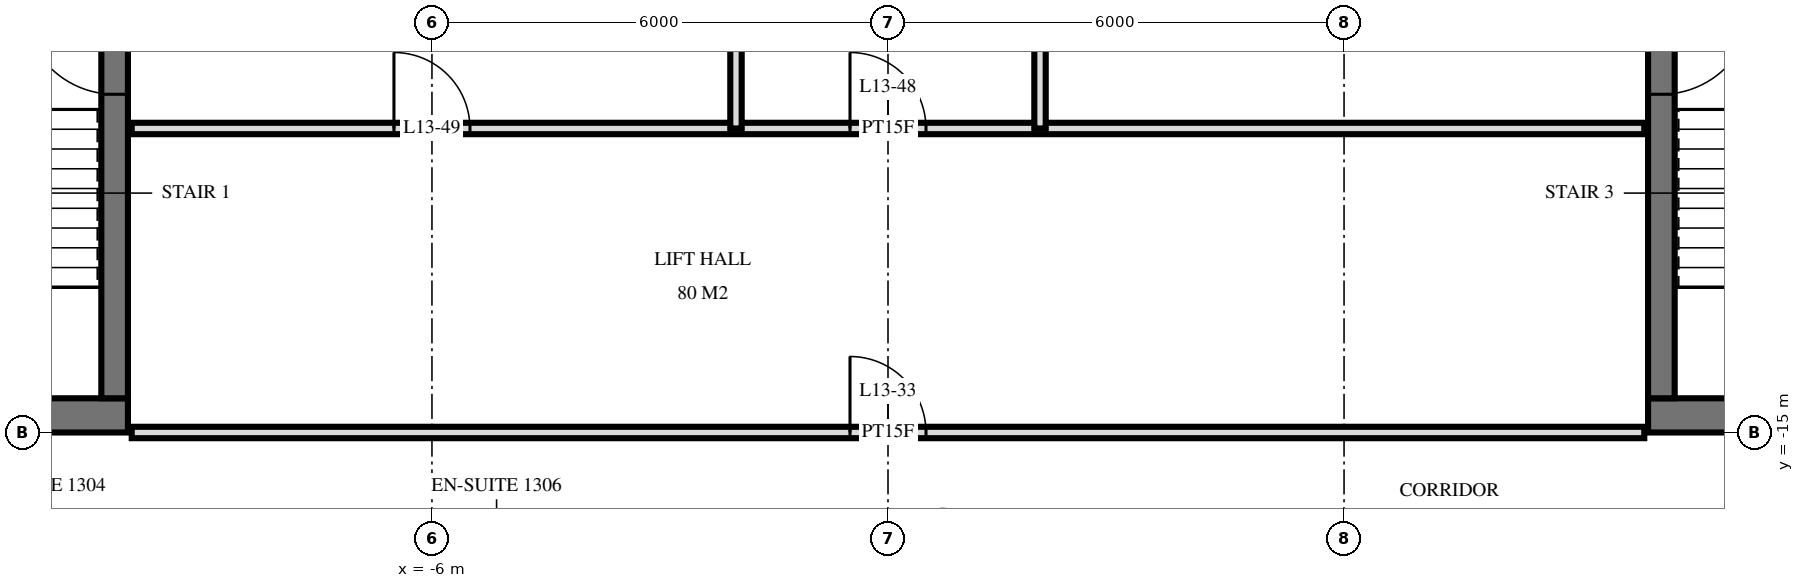
"""IFC4 building model, lengths in metres.
Left out: names, types, materials, properties, quantities, classifications, styles, units other than length and angle.
Written with IfcOpenShell. Run it as: python <this file> out.ifc"""

import sys

from ifc_helpers import new_model, si_unit, direction, frame, frame_2d, origin, place, context, subcontext, project, spatial, rectangle, extrude, element, fill, save


model = new_model("IFC4")
c1 = context("Model", 3, precision=1e-05, world=origin(), true_north=direction((0.0, 1.0)))
c2 = subcontext(c1, "Body", "Model", "MODEL_VIEW")
j1 = project(units=[si_unit("LENGTHUNIT", "METRE"), si_unit("PLANEANGLEUNIT", "RADIAN")], contexts=[c1])
p1 = place(None, origin())
s1 = spatial("IfcSite", under=j1, at=p1, CompositionType="ELEMENT")
p2 = place(p1, origin())
s2 = spatial("IfcBuilding", under=s1, at=p2, CompositionType="ELEMENT")
p3 = place(p2, frame((0.0, 0.0, 56.4)))
s3 = spatial("IfcBuildingStorey", under=s2, at=p3, CompositionType="ELEMENT", Elevation=56.4)
p4 = place(p3, frame((-29.5, -14.775, 0.0), z_axis=(0.0, 0.0, 1.0), x_axis=(1.0, 0.0, 0.0)))
e1 = element("IfcWall", 1, at=p4, inside=s3, PredefinedType="SHEAR", context=c2, shape_type="SweptSolid", body=[
    extrude(rectangle(XDim=19.5, YDim=0.45, at=frame_2d((9.75, 0.0))), origin(), (0.0, 0.0, 1.0), 3.6),
])
p5 = place(p4, frame((11.2, 0.0, 0.0)))
e2 = element("IfcOpeningElement", 2, at=p5, cuts=e1, PredefinedType="OPENING", context=c2, shape_type="SweptSolid", body=[
    extrude(rectangle(XDim=1.2, YDim=2.1, at=frame_2d((0.6, 1.05))), frame((0.0, 0.235, 0.0), z_axis=(0.0, -1.0, 0.0), x_axis=(1.0, 0.0, 0.0)), (0.0, 0.0, 1.0), 0.47),
])
p6 = place(p4, frame((14.25, 0.0, 0.0)))
e3 = element("IfcOpeningElement", 3, at=p6, cuts=e1, PredefinedType="OPENING", context=c2, shape_type="SweptSolid", body=[
    extrude(rectangle(XDim=1.1, YDim=2.1, at=frame_2d((0.55, 1.05))), frame((0.0, 0.235, 0.0), z_axis=(0.0, -1.0, 0.0), x_axis=(1.0, 0.0, 0.0)), (0.0, 0.0, 1.0), 0.47),
])
p7 = place(p4, frame((8.5, 0.0, 0.0)))
e4 = element("IfcOpeningElement", 4, at=p7, cuts=e1, PredefinedType="OPENING", context=c2, shape_type="SweptSolid", body=[
    extrude(rectangle(XDim=0.9, YDim=2.1, at=frame_2d((0.45, 1.05))), frame((0.0, 0.235, 0.0), z_axis=(0.0, -1.0, 0.0), x_axis=(1.0, 0.0, 0.0)), (0.0, 0.0, 1.0), 0.47),
])
p8 = place(p4, frame((6.05, 0.0, 0.0)))
e5 = element("IfcOpeningElement", 5, at=p8, cuts=e1, PredefinedType="OPENING", context=c2, shape_type="SweptSolid", body=[
    extrude(rectangle(XDim=1.0, YDim=2.1, at=frame_2d((0.5, 1.05))), frame((0.0, 0.235, 0.0), z_axis=(0.0, -1.0, 0.0), x_axis=(1.0, 0.0, 0.0)), (0.0, 0.0, 1.0), 0.47),
])
p9 = place(p4, frame((3.413, 0.0, 0.0)))
e6 = element("IfcOpeningElement", 6, at=p9, cuts=e1, PredefinedType="OPENING", context=c2, shape_type="SweptSolid", body=[
    extrude(rectangle(XDim=1.0, YDim=2.1, at=frame_2d((0.5, 1.05))), frame((0.0, 0.235, 0.0), z_axis=(0.0, -1.0, 0.0), x_axis=(1.0, 0.0, 0.0)), (0.0, 0.0, 1.0), 0.47),
])
p10 = place(p4, frame((1.087, 0.0, 0.0)))
e7 = element("IfcOpeningElement", 7, at=p10, cuts=e1, PredefinedType="OPENING", context=c2, shape_type="SweptSolid", body=[
    extrude(rectangle(XDim=1.0, YDim=2.1, at=frame_2d((0.5, 1.05))), frame((0.0, 0.235, 0.0), z_axis=(0.0, -1.0, 0.0), x_axis=(1.0, 0.0, 0.0)), (0.0, 0.0, 1.0), 0.47),
])
p11 = place(p3, frame((-10.175, -14.55, 0.0), z_axis=(0.0, 0.0, 1.0), x_axis=(0.0, 1.0, 0.0)))
e8 = element("IfcWall", 8, at=p11, inside=s3, PredefinedType="SHEAR", context=c2, shape_type="SweptSolid", body=[
    extrude(rectangle(XDim=14.1, YDim=0.35, at=frame_2d((7.05, 0.0))), origin(), (0.0, 0.0, 1.0), 3.6),
])
p12 = place(p11, frame((8.4, 0.0, 0.0)))
e9 = element("IfcOpeningElement", 9, at=p12, cuts=e8, PredefinedType="OPENING", context=c2, shape_type="SweptSolid", body=[
    extrude(rectangle(XDim=1.4, YDim=2.4, at=frame_2d((0.7, 1.2))), frame((0.0, 0.185, 0.0), z_axis=(0.0, -1.0, 0.0), x_axis=(1.0, 0.0, 0.0)), (0.0, 0.0, 1.0), 0.37),
])
p13 = place(p11, frame((10.0, 0.0, 0.0)))
e10 = element("IfcOpeningElement", 10, at=p13, cuts=e8, PredefinedType="OPENING", context=c2, shape_type="SweptSolid", body=[
    extrude(rectangle(XDim=1.4, YDim=2.4, at=frame_2d((0.7, 1.2))), frame((0.0, 0.185, 0.0), z_axis=(0.0, -1.0, 0.0), x_axis=(1.0, 0.0, 0.0)), (0.0, 0.0, 1.0), 0.37),
])
p14 = place(p11, frame((4.0, 0.0, 0.0)))
e11 = element("IfcOpeningElement", 11, at=p14, cuts=e8, PredefinedType="OPENING", context=c2, shape_type="SweptSolid", body=[
    extrude(rectangle(XDim=1.2, YDim=2.1, at=frame_2d((0.6, 1.05))), frame((0.0, 0.185, 0.0), z_axis=(0.0, -1.0, 0.0), x_axis=(1.0, 0.0, 0.0)), (0.0, 0.0, 1.0), 0.37),
])
p15 = place(p3, frame((10.0, -14.775, 0.0), z_axis=(0.0, 0.0, 1.0), x_axis=(1.0, 0.0, 0.0)))
e12 = element("IfcWall", 12, at=p15, inside=s3, PredefinedType="SHEAR", context=c2, shape_type="SweptSolid", body=[
    extrude(rectangle(XDim=19.5, YDim=0.45, at=frame_2d((9.75, 0.0))), origin(), (0.0, 0.0, 1.0), 3.6),
])
p16 = place(p15, frame((7.1, 0.0, 0.0)))
e13 = element("IfcOpeningElement", 13, at=p16, cuts=e12, PredefinedType="OPENING", context=c2, shape_type="SweptSolid", body=[
    extrude(rectangle(XDim=1.2, YDim=2.1, at=frame_2d((0.6, 1.05))), frame((0.0, 0.235, 0.0), z_axis=(0.0, -1.0, 0.0), x_axis=(1.0, 0.0, 0.0)), (0.0, 0.0, 1.0), 0.47),
])
p17 = place(p15, frame((4.15, 0.0, 0.0)))
e14 = element("IfcOpeningElement", 14, at=p17, cuts=e12, PredefinedType="OPENING", context=c2, shape_type="SweptSolid", body=[
    extrude(rectangle(XDim=1.1, YDim=2.1, at=frame_2d((0.55, 1.05))), frame((0.0, 0.235, 0.0), z_axis=(0.0, -1.0, 0.0), x_axis=(1.0, 0.0, 0.0)), (0.0, 0.0, 1.0), 0.47),
])
p18 = place(p15, frame((10.1, 0.0, 0.0)))
e15 = element("IfcOpeningElement", 15, at=p18, cuts=e12, PredefinedType="OPENING", context=c2, shape_type="SweptSolid", body=[
    extrude(rectangle(XDim=0.9, YDim=2.1, at=frame_2d((0.45, 1.05))), frame((0.0, 0.235, 0.0), z_axis=(0.0, -1.0, 0.0), x_axis=(1.0, 0.0, 0.0)), (0.0, 0.0, 1.0), 0.47),
])
p19 = place(p15, frame((12.45, 0.0, 0.0)))
e16 = element("IfcOpeningElement", 16, at=p19, cuts=e12, PredefinedType="OPENING", context=c2, shape_type="SweptSolid", body=[
    extrude(rectangle(XDim=1.0, YDim=2.1, at=frame_2d((0.5, 1.05))), frame((0.0, 0.235, 0.0), z_axis=(0.0, -1.0, 0.0), x_axis=(1.0, 0.0, 0.0)), (0.0, 0.0, 1.0), 0.47),
])
p20 = place(p15, frame((15.087, 0.0, 0.0)))
e17 = element("IfcOpeningElement", 17, at=p20, cuts=e12, PredefinedType="OPENING", context=c2, shape_type="SweptSolid", body=[
    extrude(rectangle(XDim=1.0, YDim=2.1, at=frame_2d((0.5, 1.05))), frame((0.0, 0.235, 0.0), z_axis=(0.0, -1.0, 0.0), x_axis=(1.0, 0.0, 0.0)), (0.0, 0.0, 1.0), 0.47),
])
p21 = place(p15, frame((17.413, 0.0, 0.0)))
e18 = element("IfcOpeningElement", 18, at=p21, cuts=e12, PredefinedType="OPENING", context=c2, shape_type="SweptSolid", body=[
    extrude(rectangle(XDim=1.0, YDim=2.1, at=frame_2d((0.5, 1.05))), frame((0.0, 0.235, 0.0), z_axis=(0.0, -1.0, 0.0), x_axis=(1.0, 0.0, 0.0)), (0.0, 0.0, 1.0), 0.47),
])
p22 = place(p3, frame((10.175, -14.55, 0.0), z_axis=(0.0, 0.0, 1.0), x_axis=(0.0, 1.0, 0.0)))
e19 = element("IfcWall", 19, at=p22, inside=s3, PredefinedType="SHEAR", context=c2, shape_type="SweptSolid", body=[
    extrude(rectangle(XDim=14.1, YDim=0.35, at=frame_2d((7.05, 0.0))), origin(), (0.0, 0.0, 1.0), 3.6),
])
p23 = place(p22, frame((8.4, 0.0, 0.0)))
e20 = element("IfcOpeningElement", 20, at=p23, cuts=e19, PredefinedType="OPENING", context=c2, shape_type="SweptSolid", body=[
    extrude(rectangle(XDim=1.4, YDim=2.4, at=frame_2d((0.7, 1.2))), frame((0.0, 0.185, 0.0), z_axis=(0.0, -1.0, 0.0), x_axis=(1.0, 0.0, 0.0)), (0.0, 0.0, 1.0), 0.37),
])
p24 = place(p22, frame((10.0, 0.0, 0.0)))
e21 = element("IfcOpeningElement", 21, at=p24, cuts=e19, PredefinedType="OPENING", context=c2, shape_type="SweptSolid", body=[
    extrude(rectangle(XDim=1.4, YDim=2.4, at=frame_2d((0.7, 1.2))), frame((0.0, 0.185, 0.0), z_axis=(0.0, -1.0, 0.0), x_axis=(1.0, 0.0, 0.0)), (0.0, 0.0, 1.0), 0.37),
])
p25 = place(p22, frame((4.0, 0.0, 0.0)))
e22 = element("IfcOpeningElement", 22, at=p25, cuts=e19, PredefinedType="OPENING", context=c2, shape_type="SweptSolid", body=[
    extrude(rectangle(XDim=1.2, YDim=2.1, at=frame_2d((0.6, 1.05))), frame((0.0, 0.185, 0.0), z_axis=(0.0, -1.0, 0.0), x_axis=(1.0, 0.0, 0.0)), (0.0, 0.0, 1.0), 0.37),
])
for number, where, z_axis, x_axis in (
    (23, (2.0, -11.0, 0.0), (0.0, 0.0, 1.0), (0.0, 1.0, 0.0)),
    (24, (-2.0, -11.0, 0.0), (0.0, 0.0, 1.0), (0.0, 1.0, 0.0)),
):
    element("IfcWall", number, at=place(p3, frame(where, z_axis=z_axis, x_axis=x_axis)), inside=s3, PredefinedType="PARTITIONING", context=c2, shape_type="SweptSolid", body=[
        extrude(rectangle(XDim=4.0, YDim=0.15, at=frame_2d((2.0, 0.0))), origin(), (0.0, 0.0, 1.0), 3.32),
    ])
p26 = place(p3, frame((-9.95, -15.0, 0.0), z_axis=(0.0, 0.0, 1.0), x_axis=(1.0, 0.0, 0.0)))
e25 = element("IfcWall", 25, at=p26, inside=s3, PredefinedType="PARTITIONING", context=c2, shape_type="SweptSolid", body=[
    extrude(rectangle(XDim=19.9, YDim=0.15, at=frame_2d((9.95, 0.0))), origin(), (0.0, 0.0, 1.0), 2.684),
])
p27 = place(p26, frame((9.45, 0.0, 0.0)))
e26 = element("IfcOpeningElement", 26, at=p27, cuts=e25, PredefinedType="OPENING", context=c2, shape_type="SweptSolid", body=[
    extrude(rectangle(XDim=1.0, YDim=2.1, at=frame_2d((0.5, 1.05))), frame((0.0, 0.085, 0.0), z_axis=(0.0, -1.0, 0.0), x_axis=(1.0, 0.0, 0.0)), (0.0, 0.0, 1.0), 0.17),
])
p28 = place(p3, frame((-9.95, -11.0, 0.0), z_axis=(0.0, 0.0, 1.0), x_axis=(1.0, 0.0, 0.0)))
e27 = element("IfcWall", 27, at=p28, inside=s3, PredefinedType="PARTITIONING", context=c2, shape_type="SweptSolid", body=[
    extrude(rectangle(XDim=19.9, YDim=0.15, at=frame_2d((9.95, 0.0))), origin(), (0.0, 0.0, 1.0), 3.32),
])
p29 = place(p28, frame((9.45, 0.0, 0.0)))
e28 = element("IfcOpeningElement", 28, at=p29, cuts=e27, PredefinedType="OPENING", context=c2, shape_type="SweptSolid", body=[
    extrude(rectangle(XDim=1.0, YDim=2.1, at=frame_2d((0.5, 1.05))), frame((0.0, 0.085, 0.0), z_axis=(0.0, -1.0, 0.0), x_axis=(1.0, 0.0, 0.0)), (0.0, 0.0, 1.0), 0.17),
])
p30 = place(p28, frame((3.45, 0.0, 0.0)))
e29 = element("IfcOpeningElement", 29, at=p30, cuts=e27, PredefinedType="OPENING", context=c2, shape_type="SweptSolid", body=[
    extrude(rectangle(XDim=1.0, YDim=2.1, at=frame_2d((0.5, 1.05))), frame((0.0, 0.085, 0.0), z_axis=(0.0, -1.0, 0.0), x_axis=(1.0, 0.0, 0.0)), (0.0, 0.0, 1.0), 0.17),
])
p31 = place(p14, origin())
e30 = element("IfcDoor", 30, at=p31, inside=s3, OperationType="SINGLE_SWING_LEFT", PredefinedType="DOOR", context=c2, shape_type="SweptSolid", body=[
    extrude(rectangle(XDim=1.2, YDim=2.1, at=frame_2d((0.6, 1.05))), frame((0.0, 0.025, 0.0), z_axis=(0.0, -1.0, 0.0), x_axis=(1.0, 0.0, 0.0)), (0.0, 0.0, 1.0), 0.05),
])
fill(e11, e30)
p32 = place(p25, frame((0.6, 0.0, 0.0), z_axis=(0.0, 0.0, 1.0), x_axis=(-1.0, 0.0, 0.0)))
e31 = element("IfcDoor", 31, at=p32, inside=s3, OperationType="SINGLE_SWING_RIGHT", PredefinedType="DOOR", context=c2, shape_type="SweptSolid", body=[
    extrude(rectangle(XDim=1.2, YDim=2.1, at=frame_2d((0.0, 1.05))), frame((0.0, -0.025, 0.0), z_axis=(0.0, 1.0, 0.0), x_axis=(-1.0, 0.0, 0.0)), (0.0, 0.0, 1.0), 0.05),
])
fill(e22, e31)
p33 = place(p27, origin())
e32 = element("IfcDoor", 32, at=p33, inside=s3, OperationType="SINGLE_SWING_RIGHT", PredefinedType="DOOR", context=c2, shape_type="SweptSolid", body=[
    extrude(rectangle(XDim=1.0, YDim=2.1, at=frame_2d((0.5, 1.05))), frame((0.0, 0.025, 0.0), z_axis=(0.0, -1.0, 0.0), x_axis=(1.0, 0.0, 0.0)), (0.0, 0.0, 1.0), 0.05),
])
fill(e26, e32)
p34 = place(p29, origin())
e33 = element("IfcDoor", 33, at=p34, inside=s3, OperationType="SINGLE_SWING_RIGHT", PredefinedType="DOOR", context=c2, shape_type="SweptSolid", body=[
    extrude(rectangle(XDim=1.0, YDim=2.1, at=frame_2d((0.5, 1.05))), frame((0.0, 0.025, 0.0), z_axis=(0.0, -1.0, 0.0), x_axis=(1.0, 0.0, 0.0)), (0.0, 0.0, 1.0), 0.05),
])
fill(e28, e33)
p35 = place(p30, origin())
e34 = element("IfcDoor", 34, at=p35, inside=s3, OperationType="SINGLE_SWING_RIGHT", PredefinedType="DOOR", context=c2, shape_type="SweptSolid", body=[
    extrude(rectangle(XDim=1.0, YDim=2.1, at=frame_2d((0.5, 1.05))), frame((0.0, 0.025, 0.0), z_axis=(0.0, -1.0, 0.0), x_axis=(1.0, 0.0, 0.0)), (0.0, 0.0, 1.0), 0.05),
])
fill(e29, e34)
save(model, sys.argv[1])
